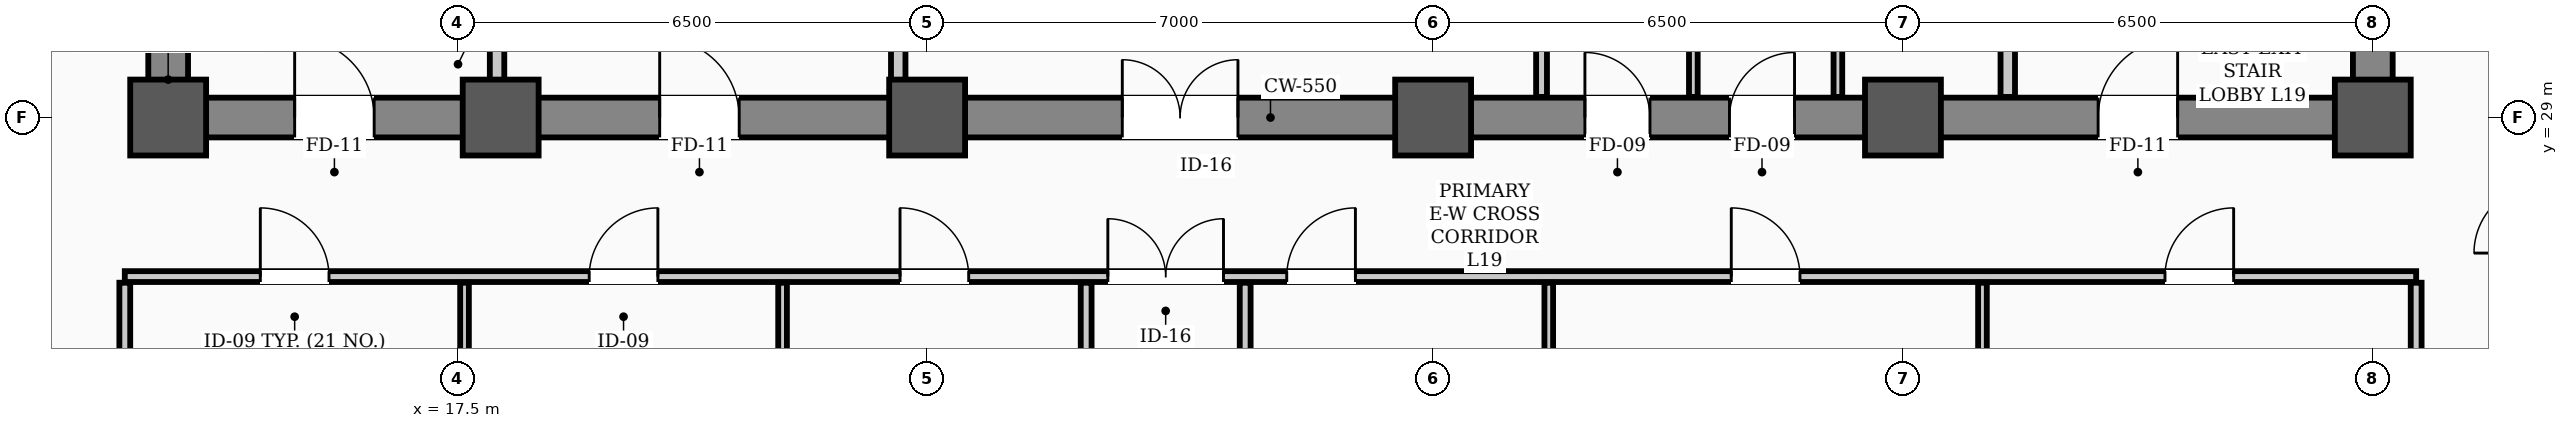
"""IFC4 building model, lengths in metres.
Left out: names, types, materials, properties, quantities, classifications, styles, units other than length and angle.
Written with IfcOpenShell. Run it as: python <this file> out.ifc"""

import sys

from ifc_helpers import new_model, si_unit, direction, frame, frame_2d, origin, origin_2d, place, context, subcontext, project, spatial, rectangle, hollow_rectangle, extrude, element, fill, save


model = new_model("IFC4")
c1 = context("Model", 3, precision=1e-05, world=origin(), true_north=direction((0.0, 1.0)))
c2 = subcontext(c1, "Body", "Model", "MODEL_VIEW")
j1 = project(units=[si_unit("LENGTHUNIT", "METRE"), si_unit("PLANEANGLEUNIT", "RADIAN")], contexts=[c1])
p1 = place(None, origin())
s1 = spatial("IfcSite", under=j1, at=p1, CompositionType="ELEMENT")
p2 = place(p1, origin())
s2 = spatial("IfcBuilding", under=s1, at=p2, CompositionType="ELEMENT")
p3 = place(p2, frame((0.0, 0.0, 77.2)))
s3 = spatial("IfcBuildingStorey", under=s2, at=p3, CompositionType="ELEMENT", Elevation=77.2)
for number, where, z_axis, x_axis in (
    (1, (13.5, 29.0, 0.0), (0.0, 0.0, 1.0), (1.0, 0.0, 0.0)),
    (2, (18.1, 29.0, 0.0), (0.0, 0.0, 1.0), (1.0, 0.0, 0.0)),
    (3, (24.0, 29.0, 0.0), (0.0, 0.0, 1.0), (1.0, 0.0, 0.0)),
    (4, (31.0, 29.0, 0.0), (0.0, 0.0, 1.0), (1.0, 0.0, 0.0)),
    (5, (37.5, 29.0, 0.0), (0.0, 0.0, 1.0), (1.0, 0.0, 0.0)),
    (6, (44.0, 29.0, 0.0), (0.0, 0.0, 1.0), (1.0, 0.0, 0.0)),
):
    element("IfcColumn", number, at=place(p3, frame(where, z_axis=z_axis, x_axis=x_axis)), inside=s3, PredefinedType="COLUMN", context=c2, shape_type="SweptSolid", body=[
        extrude(hollow_rectangle(XDim=1.05, YDim=1.05, WallThickness=0.038, InnerFilletRadius=0.019, OuterFilletRadius=0.057, at=origin_2d()), origin(), (0.0, 0.0, 1.0), 3.9),
    ])
p4 = place(p3, frame((13.5, 29.0, 0.0), z_axis=(0.0, 0.0, 1.0), x_axis=(1.0, 0.0, 0.0)))
e7 = element("IfcWall", 7, at=p4, inside=s3, PredefinedType="SHEAR", context=c2, shape_type="SweptSolid", body=[
    extrude(rectangle(XDim=30.5, YDim=0.55, at=frame_2d((15.25, 0.0))), origin(), (0.0, 0.0, 1.0), 3.66),
])
p5 = place(p4, frame((1.75, 0.0, 0.0)))
e8 = element("IfcOpeningElement", 8, at=p5, cuts=e7, PredefinedType="OPENING", context=c2, shape_type="SweptSolid", body=[
    extrude(rectangle(XDim=1.1, YDim=2.08, at=frame_2d((0.55, 1.04))), frame((0.0, 0.285, 0.0), z_axis=(0.0, -1.0, 0.0), x_axis=(1.0, 0.0, 0.0)), (0.0, 0.0, 1.0), 0.57),
])
p6 = place(p4, frame((26.7, 0.0, 0.0)))
e9 = element("IfcOpeningElement", 9, at=p6, cuts=e7, PredefinedType="OPENING", context=c2, shape_type="SweptSolid", body=[
    extrude(rectangle(XDim=1.1, YDim=2.08, at=frame_2d((0.55, 1.04))), frame((0.0, 0.285, 0.0), z_axis=(0.0, -1.0, 0.0), x_axis=(1.0, 0.0, 0.0)), (0.0, 0.0, 1.0), 0.57),
])
p7 = place(p4, frame((6.8, 0.0, 0.0)))
e10 = element("IfcOpeningElement", 10, at=p7, cuts=e7, PredefinedType="OPENING", context=c2, shape_type="SweptSolid", body=[
    extrude(rectangle(XDim=1.1, YDim=2.08, at=frame_2d((0.55, 1.04))), frame((0.0, 0.285, 0.0), z_axis=(0.0, -1.0, 0.0), x_axis=(1.0, 0.0, 0.0)), (0.0, 0.0, 1.0), 0.57),
])
p8 = place(p4, frame((13.2, 0.0, 0.0)))
e11 = element("IfcOpeningElement", 11, at=p8, cuts=e7, PredefinedType="OPENING", context=c2, shape_type="SweptSolid", body=[
    extrude(rectangle(XDim=1.6, YDim=2.08, at=frame_2d((0.8, 1.04))), frame((0.0, 0.285, 0.0), z_axis=(0.0, -1.0, 0.0), x_axis=(1.0, 0.0, 0.0)), (0.0, 0.0, 1.0), 0.57),
])
p9 = place(p4, frame((19.6, 0.0, 0.0)))
e12 = element("IfcOpeningElement", 12, at=p9, cuts=e7, PredefinedType="OPENING", context=c2, shape_type="SweptSolid", body=[
    extrude(rectangle(XDim=0.9, YDim=2.08, at=frame_2d((0.45, 1.04))), frame((0.0, 0.285, 0.0), z_axis=(0.0, -1.0, 0.0), x_axis=(1.0, 0.0, 0.0)), (0.0, 0.0, 1.0), 0.57),
])
p10 = place(p4, frame((21.6, 0.0, 0.0)))
e13 = element("IfcOpeningElement", 13, at=p10, cuts=e7, PredefinedType="OPENING", context=c2, shape_type="SweptSolid", body=[
    extrude(rectangle(XDim=0.9, YDim=2.08, at=frame_2d((0.45, 1.04))), frame((0.0, 0.285, 0.0), z_axis=(0.0, -1.0, 0.0), x_axis=(1.0, 0.0, 0.0)), (0.0, 0.0, 1.0), 0.57),
])
for number, where, z_axis, x_axis in (
    (14, (13.5, 29.35, 0.0), (0.0, 0.0, 1.0), (0.0, 1.0, 0.0)),
    (15, (44.0, 29.35, 0.0), (0.0, 0.0, 1.0), (0.0, 1.0, 0.0)),
):
    element("IfcWall", number, at=place(p3, frame(where, z_axis=z_axis, x_axis=x_axis)), inside=s3, PredefinedType="SHEAR", context=c2, shape_type="SweptSolid", body=[
        extrude(rectangle(XDim=8.6, YDim=0.55, at=frame_2d((4.3, 0.0))), origin(), (0.0, 0.0, 1.0), 3.66),
    ])
p11 = place(p3, frame((12.9, 26.8, 0.0), z_axis=(0.0, 0.0, 1.0), x_axis=(1.0, 0.0, 0.0)))
e16 = element("IfcWall", 16, at=p11, inside=s3, PredefinedType="PARTITIONING", context=c2, shape_type="SweptSolid", body=[
    extrude(rectangle(XDim=31.7, YDim=0.15, at=frame_2d((15.85, 0.0))), origin(), (0.0, 0.0, 1.0), 2.24),
])
p12 = place(p11, frame((13.6, 0.0, 0.0)))
e17 = element("IfcOpeningElement", 17, at=p12, cuts=e16, PredefinedType="OPENING", context=c2, shape_type="SweptSolid", body=[
    extrude(rectangle(XDim=1.6, YDim=2.08, at=frame_2d((0.8, 1.04))), frame((0.0, 0.085, 0.0), z_axis=(0.0, -1.0, 0.0), x_axis=(1.0, 0.0, 0.0)), (0.0, 0.0, 1.0), 0.17),
])
p13 = place(p11, frame((1.875, 0.0, 0.0)))
e18 = element("IfcOpeningElement", 18, at=p13, cuts=e16, PredefinedType="OPENING", context=c2, shape_type="SweptSolid", body=[
    extrude(rectangle(XDim=0.95, YDim=2.08, at=frame_2d((0.475, 1.04))), frame((0.0, 0.085, 0.0), z_axis=(0.0, -1.0, 0.0), x_axis=(1.0, 0.0, 0.0)), (0.0, 0.0, 1.0), 0.17),
])
p14 = place(p11, frame((6.425, 0.0, 0.0)))
e19 = element("IfcOpeningElement", 19, at=p14, cuts=e16, PredefinedType="OPENING", context=c2, shape_type="SweptSolid", body=[
    extrude(rectangle(XDim=0.95, YDim=2.08, at=frame_2d((0.475, 1.04))), frame((0.0, 0.085, 0.0), z_axis=(0.0, -1.0, 0.0), x_axis=(1.0, 0.0, 0.0)), (0.0, 0.0, 1.0), 0.17),
])
p15 = place(p11, frame((10.725, 0.0, 0.0)))
e20 = element("IfcOpeningElement", 20, at=p15, cuts=e16, PredefinedType="OPENING", context=c2, shape_type="SweptSolid", body=[
    extrude(rectangle(XDim=0.95, YDim=2.08, at=frame_2d((0.475, 1.04))), frame((0.0, 0.085, 0.0), z_axis=(0.0, -1.0, 0.0), x_axis=(1.0, 0.0, 0.0)), (0.0, 0.0, 1.0), 0.17),
])
p16 = place(p11, frame((16.075, 0.0, 0.0)))
e21 = element("IfcOpeningElement", 21, at=p16, cuts=e16, PredefinedType="OPENING", context=c2, shape_type="SweptSolid", body=[
    extrude(rectangle(XDim=0.95, YDim=2.08, at=frame_2d((0.475, 1.04))), frame((0.0, 0.085, 0.0), z_axis=(0.0, -1.0, 0.0), x_axis=(1.0, 0.0, 0.0)), (0.0, 0.0, 1.0), 0.17),
])
p17 = place(p11, frame((22.225, 0.0, 0.0)))
e22 = element("IfcOpeningElement", 22, at=p17, cuts=e16, PredefinedType="OPENING", context=c2, shape_type="SweptSolid", body=[
    extrude(rectangle(XDim=0.95, YDim=2.08, at=frame_2d((0.475, 1.04))), frame((0.0, 0.085, 0.0), z_axis=(0.0, -1.0, 0.0), x_axis=(1.0, 0.0, 0.0)), (0.0, 0.0, 1.0), 0.17),
])
p18 = place(p11, frame((28.225, 0.0, 0.0)))
e23 = element("IfcOpeningElement", 23, at=p18, cuts=e16, PredefinedType="OPENING", context=c2, shape_type="SweptSolid", body=[
    extrude(rectangle(XDim=0.95, YDim=2.08, at=frame_2d((0.475, 1.04))), frame((0.0, 0.085, 0.0), z_axis=(0.0, -1.0, 0.0), x_axis=(1.0, 0.0, 0.0)), (0.0, 0.0, 1.0), 0.17),
])
for number, where, z_axis, x_axis in (
    (24, (18.05, 29.285, 0.0), (0.0, 0.0, 1.0), (0.0, 1.0, 0.0)),
    (25, (38.95, 29.285, 0.0), (0.0, 0.0, 1.0), (0.0, 1.0, 0.0)),
):
    element("IfcWall", number, at=place(p3, frame(where, z_axis=z_axis, x_axis=x_axis)), inside=s3, PredefinedType="STANDARD", context=c2, shape_type="SweptSolid", body=[
        extrude(rectangle(XDim=1.015, YDim=0.2, at=frame_2d((0.508, 0.0))), origin(), (0.0, 0.0, 1.0), 2.24),
    ])
p19 = place(p3, frame((23.6, 29.285, 0.0), z_axis=(0.0, 0.0, 1.0), x_axis=(0.0, 1.0, 0.0)))
e26 = element("IfcWall", 26, at=p19, inside=s3, PredefinedType="STANDARD", context=c2, shape_type="SweptSolid", body=[
    extrude(rectangle(XDim=5.415, YDim=0.2, at=frame_2d((2.708, 0.0))), origin(), (0.0, 0.0, 1.0), 2.24),
])
p20 = place(p3, frame((32.5, 29.285, 0.0), z_axis=(0.0, 0.0, 1.0), x_axis=(0.0, 1.0, 0.0)))
e27 = element("IfcWall", 27, at=p20, inside=s3, PredefinedType="PARTITIONING", context=c2, shape_type="SweptSolid", body=[
    extrude(rectangle(XDim=2.48, YDim=0.15, at=frame_2d((1.24, 0.0))), origin(), (0.0, 0.0, 1.0), 2.24),
])
for number, where, z_axis, x_axis in (
    (28, (36.6, 29.285, 0.0), (0.0, 0.0, 1.0), (0.0, 1.0, 0.0)),
    (29, (34.6, 29.285, 0.0), (0.0, 0.0, 1.0), (0.0, 1.0, 0.0)),
):
    element("IfcWall", number, at=place(p3, frame(where, z_axis=z_axis, x_axis=x_axis)), inside=s3, PredefinedType="PARTITIONING", context=c2, shape_type="SweptSolid", body=[
        extrude(rectangle(XDim=2.48, YDim=0.12, at=frame_2d((1.24, 0.0))), origin(), (0.0, 0.0, 1.0), 2.24),
    ])
for number, where, z_axis, x_axis in (
    (30, (26.2, 19.335, 0.0), (0.0, 0.0, 1.0), (0.0, 1.0, 0.0)),
    (31, (28.4, 19.335, 0.0), (0.0, 0.0, 1.0), (0.0, 1.0, 0.0)),
    (32, (12.9, 19.335, 0.0), (0.0, 0.0, 1.0), (0.0, 1.0, 0.0)),
    (33, (44.6, 19.335, 0.0), (0.0, 0.0, 1.0), (0.0, 1.0, 0.0)),
):
    element("IfcWall", number, at=place(p3, frame(where, z_axis=z_axis, x_axis=x_axis)), inside=s3, PredefinedType="PARTITIONING", context=c2, shape_type="SweptSolid", body=[
        extrude(rectangle(XDim=7.38, YDim=0.15, at=frame_2d((3.69, 0.0))), origin(), (0.0, 0.0, 1.0), 2.24),
    ])
for number, where, z_axis, x_axis in (
    (34, (17.6, 19.335, 0.0), (0.0, 0.0, 1.0), (0.0, 1.0, 0.0)),
    (35, (22.0, 19.335, 0.0), (0.0, 0.0, 1.0), (0.0, 1.0, 0.0)),
    (36, (32.6, 19.335, 0.0), (0.0, 0.0, 1.0), (0.0, 1.0, 0.0)),
    (37, (38.6, 19.335, 0.0), (0.0, 0.0, 1.0), (0.0, 1.0, 0.0)),
):
    element("IfcWall", number, at=place(p3, frame(where, z_axis=z_axis, x_axis=x_axis)), inside=s3, PredefinedType="PARTITIONING", context=c2, shape_type="SweptSolid", body=[
        extrude(rectangle(XDim=7.38, YDim=0.12, at=frame_2d((3.69, 0.0))), origin(), (0.0, 0.0, 1.0), 2.24),
    ])
p21 = place(p5, origin())
e38 = element("IfcDoor", 38, at=p21, inside=s3, OperationType="SINGLE_SWING_LEFT", PredefinedType="DOOR", context=c2, shape_type="SweptSolid", body=[
    extrude(rectangle(XDim=1.1, YDim=2.08, at=frame_2d((0.55, 1.04))), frame((0.0, 0.025, 0.0), z_axis=(0.0, -1.0, 0.0), x_axis=(1.0, 0.0, 0.0)), (0.0, 0.0, 1.0), 0.05),
])
fill(e8, e38)
p22 = place(p6, origin())
e39 = element("IfcDoor", 39, at=p22, inside=s3, OperationType="SINGLE_SWING_RIGHT", PredefinedType="DOOR", context=c2, shape_type="SweptSolid", body=[
    extrude(rectangle(XDim=1.1, YDim=2.08, at=frame_2d((0.55, 1.04))), frame((0.0, 0.025, 0.0), z_axis=(0.0, -1.0, 0.0), x_axis=(1.0, 0.0, 0.0)), (0.0, 0.0, 1.0), 0.05),
])
fill(e9, e39)
p23 = place(p7, origin())
e40 = element("IfcDoor", 40, at=p23, inside=s3, OperationType="SINGLE_SWING_LEFT", PredefinedType="DOOR", context=c2, shape_type="SweptSolid", body=[
    extrude(rectangle(XDim=1.1, YDim=2.08, at=frame_2d((0.55, 1.04))), frame((0.0, 0.025, 0.0), z_axis=(0.0, -1.0, 0.0), x_axis=(1.0, 0.0, 0.0)), (0.0, 0.0, 1.0), 0.05),
])
fill(e10, e40)
p24 = place(p8, origin())
e41 = element("IfcDoor", 41, at=p24, inside=s3, OperationType="DOUBLE_DOOR_SINGLE_SWING", PredefinedType="DOOR", context=c2, shape_type="SweptSolid", body=[
    extrude(rectangle(XDim=1.6, YDim=2.08, at=frame_2d((0.8, 1.04))), frame((0.0, 0.025, 0.0), z_axis=(0.0, -1.0, 0.0), x_axis=(1.0, 0.0, 0.0)), (0.0, 0.0, 1.0), 0.05),
])
fill(e11, e41)
p25 = place(p9, origin())
e42 = element("IfcDoor", 42, at=p25, inside=s3, OperationType="SINGLE_SWING_LEFT", PredefinedType="DOOR", context=c2, shape_type="SweptSolid", body=[
    extrude(rectangle(XDim=0.9, YDim=2.08, at=frame_2d((0.45, 1.04))), frame((0.0, 0.025, 0.0), z_axis=(0.0, -1.0, 0.0), x_axis=(1.0, 0.0, 0.0)), (0.0, 0.0, 1.0), 0.05),
])
fill(e12, e42)
p26 = place(p10, origin())
e43 = element("IfcDoor", 43, at=p26, inside=s3, OperationType="SINGLE_SWING_RIGHT", PredefinedType="DOOR", context=c2, shape_type="SweptSolid", body=[
    extrude(rectangle(XDim=0.9, YDim=2.08, at=frame_2d((0.45, 1.04))), frame((0.0, 0.025, 0.0), z_axis=(0.0, -1.0, 0.0), x_axis=(1.0, 0.0, 0.0)), (0.0, 0.0, 1.0), 0.05),
])
fill(e13, e43)
p27 = place(p12, origin())
e44 = element("IfcDoor", 44, at=p27, inside=s3, OperationType="DOUBLE_DOOR_SINGLE_SWING", PredefinedType="DOOR", context=c2, shape_type="SweptSolid", body=[
    extrude(rectangle(XDim=1.6, YDim=2.08, at=frame_2d((0.8, 1.04))), frame((0.0, 0.025, 0.0), z_axis=(0.0, -1.0, 0.0), x_axis=(1.0, 0.0, 0.0)), (0.0, 0.0, 1.0), 0.05),
])
fill(e17, e44)
p28 = place(p13, origin())
e45 = element("IfcDoor", 45, at=p28, inside=s3, OperationType="SINGLE_SWING_LEFT", PredefinedType="DOOR", context=c2, shape_type="SweptSolid", body=[
    extrude(rectangle(XDim=0.95, YDim=2.08, at=frame_2d((0.475, 1.04))), frame((0.0, 0.025, 0.0), z_axis=(0.0, -1.0, 0.0), x_axis=(1.0, 0.0, 0.0)), (0.0, 0.0, 1.0), 0.05),
])
fill(e18, e45)
p29 = place(p14, origin())
e46 = element("IfcDoor", 46, at=p29, inside=s3, OperationType="SINGLE_SWING_RIGHT", PredefinedType="DOOR", context=c2, shape_type="SweptSolid", body=[
    extrude(rectangle(XDim=0.95, YDim=2.08, at=frame_2d((0.475, 1.04))), frame((0.0, 0.025, 0.0), z_axis=(0.0, -1.0, 0.0), x_axis=(1.0, 0.0, 0.0)), (0.0, 0.0, 1.0), 0.05),
])
fill(e19, e46)
p30 = place(p15, origin())
e47 = element("IfcDoor", 47, at=p30, inside=s3, OperationType="SINGLE_SWING_LEFT", PredefinedType="DOOR", context=c2, shape_type="SweptSolid", body=[
    extrude(rectangle(XDim=0.95, YDim=2.08, at=frame_2d((0.475, 1.04))), frame((0.0, 0.025, 0.0), z_axis=(0.0, -1.0, 0.0), x_axis=(1.0, 0.0, 0.0)), (0.0, 0.0, 1.0), 0.05),
])
fill(e20, e47)
p31 = place(p16, origin())
e48 = element("IfcDoor", 48, at=p31, inside=s3, OperationType="SINGLE_SWING_RIGHT", PredefinedType="DOOR", context=c2, shape_type="SweptSolid", body=[
    extrude(rectangle(XDim=0.95, YDim=2.08, at=frame_2d((0.475, 1.04))), frame((0.0, 0.025, 0.0), z_axis=(0.0, -1.0, 0.0), x_axis=(1.0, 0.0, 0.0)), (0.0, 0.0, 1.0), 0.05),
])
fill(e21, e48)
p32 = place(p17, origin())
e49 = element("IfcDoor", 49, at=p32, inside=s3, OperationType="SINGLE_SWING_LEFT", PredefinedType="DOOR", context=c2, shape_type="SweptSolid", body=[
    extrude(rectangle(XDim=0.95, YDim=2.08, at=frame_2d((0.475, 1.04))), frame((0.0, 0.025, 0.0), z_axis=(0.0, -1.0, 0.0), x_axis=(1.0, 0.0, 0.0)), (0.0, 0.0, 1.0), 0.05),
])
fill(e22, e49)
p33 = place(p18, origin())
e50 = element("IfcDoor", 50, at=p33, inside=s3, OperationType="SINGLE_SWING_RIGHT", PredefinedType="DOOR", context=c2, shape_type="SweptSolid", body=[
    extrude(rectangle(XDim=0.95, YDim=2.08, at=frame_2d((0.475, 1.04))), frame((0.0, 0.025, 0.0), z_axis=(0.0, -1.0, 0.0), x_axis=(1.0, 0.0, 0.0)), (0.0, 0.0, 1.0), 0.05),
])
fill(e23, e50)
save(model, sys.argv[1])
